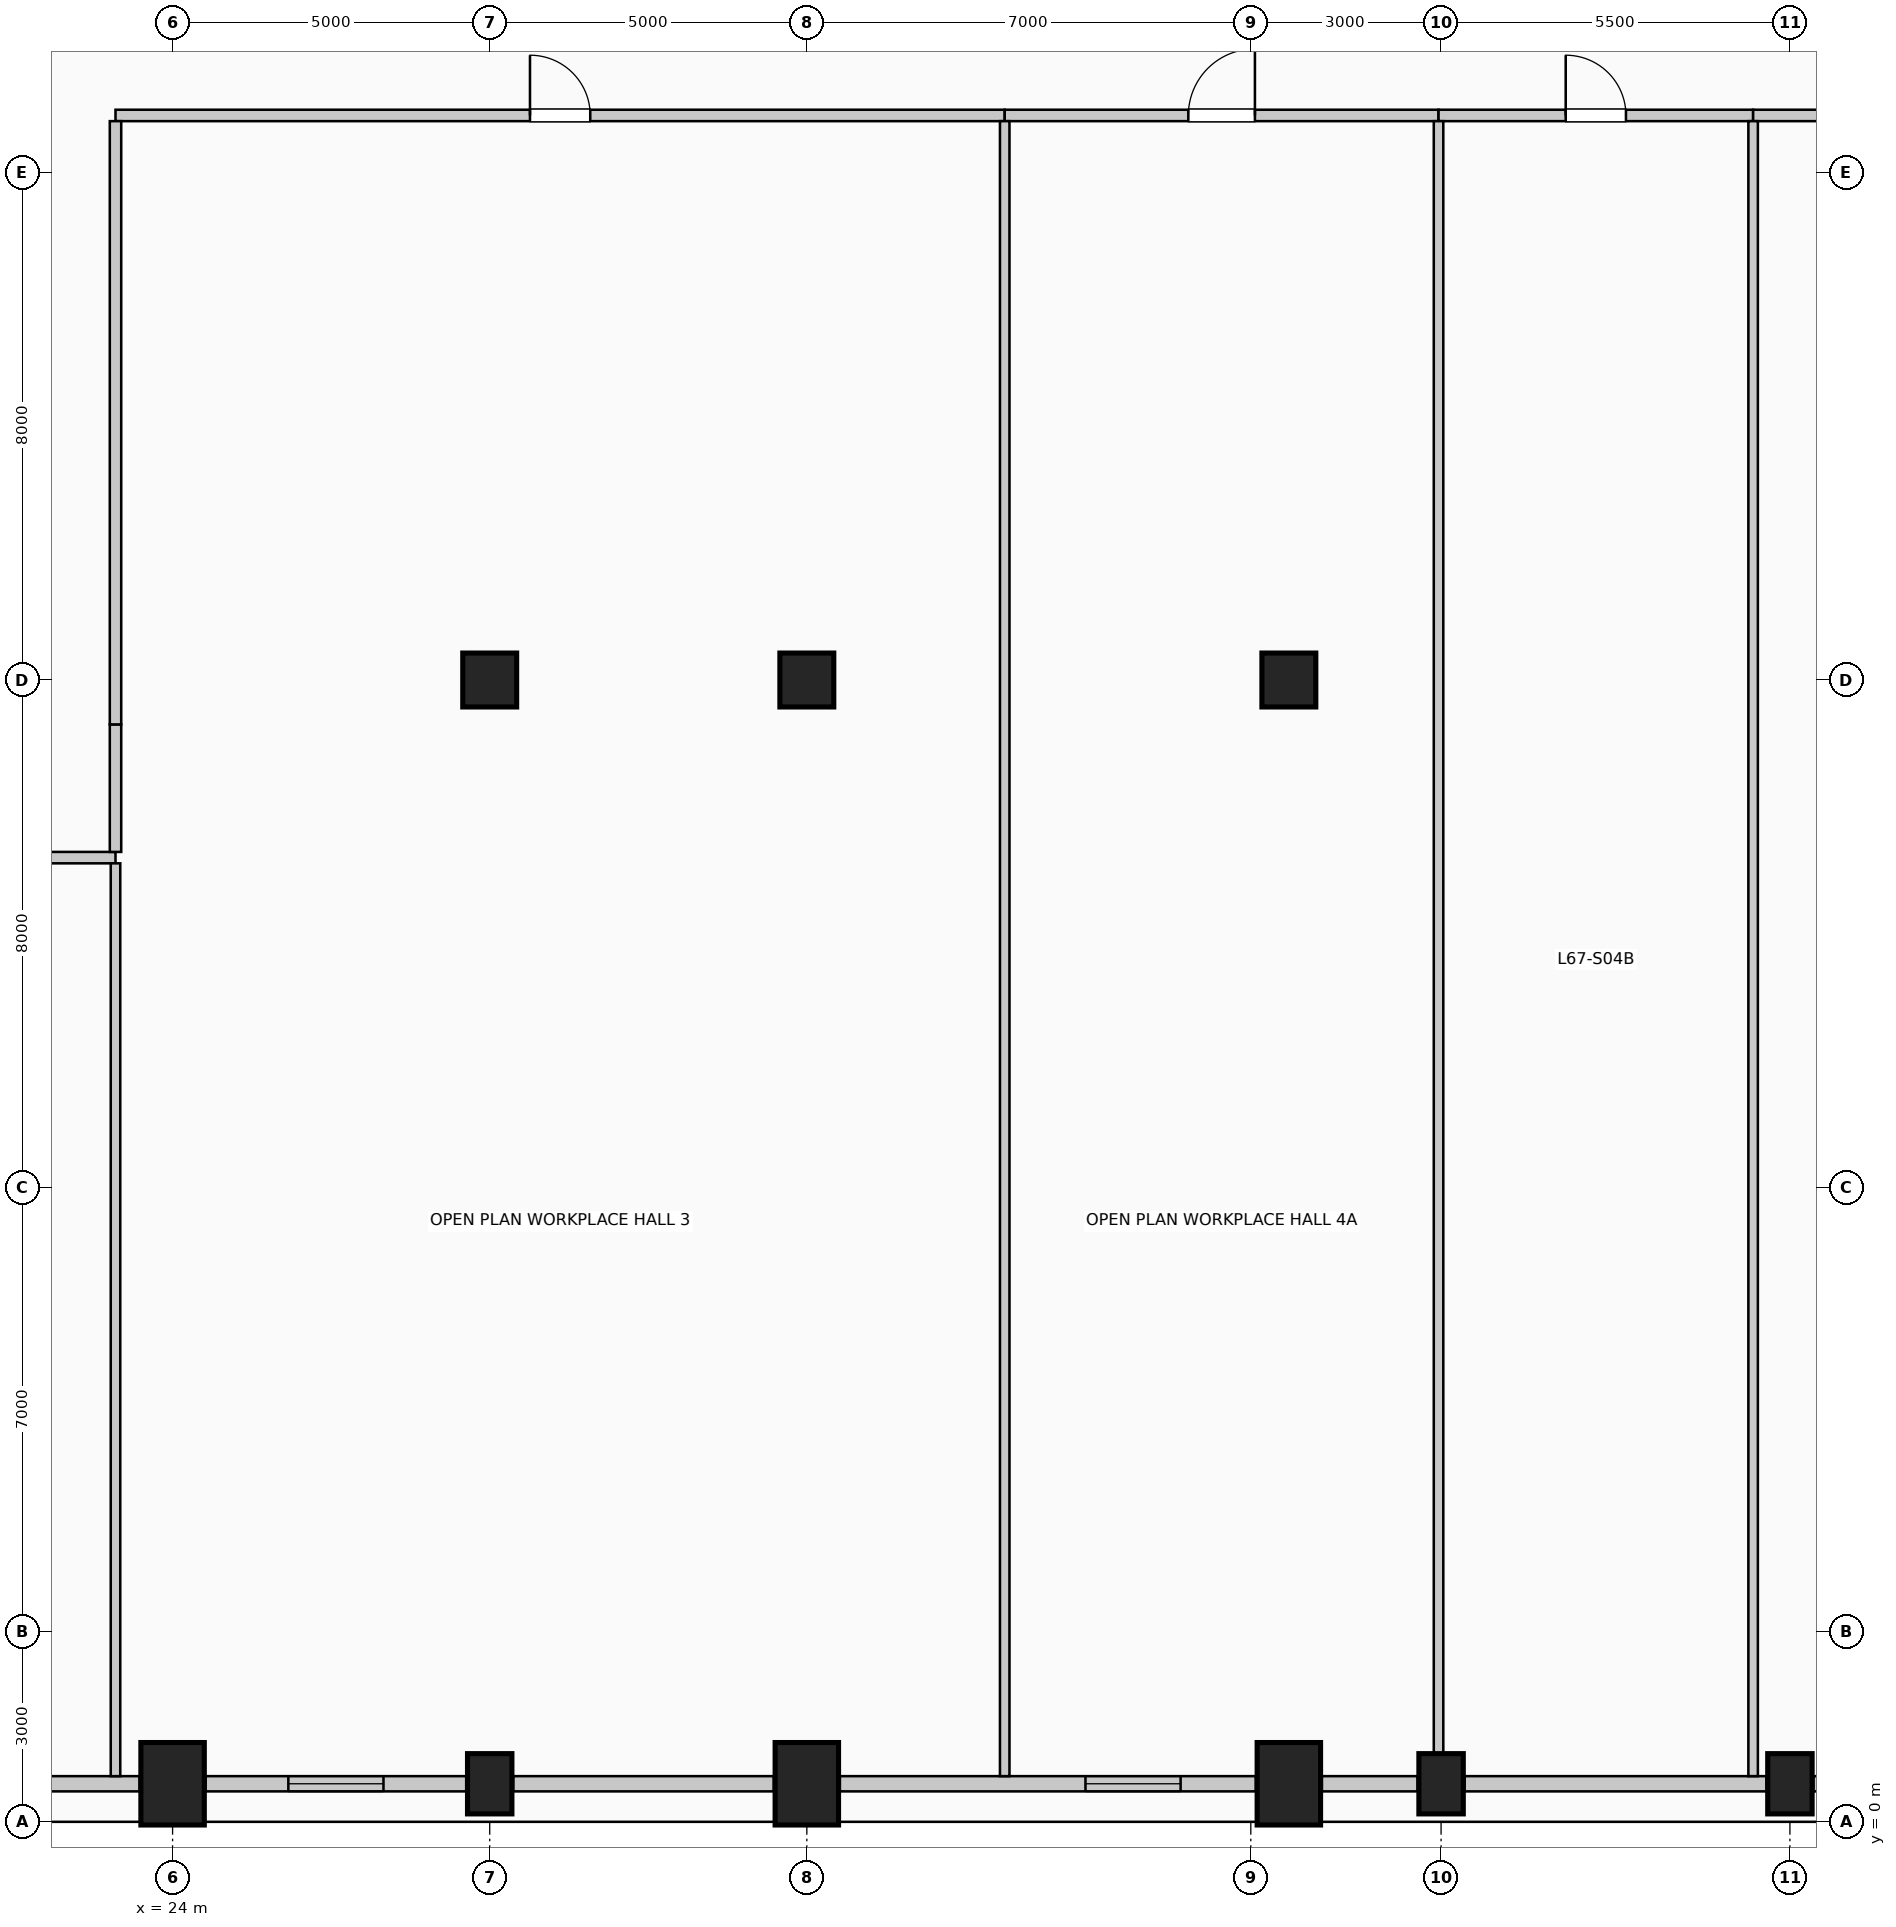
"""IFC4 building model, lengths in metres.
Left out: names, types, materials, properties, quantities, classifications, styles, units other than length and angle.
Written with IfcOpenShell. Run it as: python <this file> out.ifc"""

import sys

from ifc_helpers import new_model, si_unit, direction, frame, frame_2d, origin, origin_2d, place, context, subcontext, project, spatial, rectangle, circle, extrude, element, fill, save


model = new_model("IFC4")
c1 = context("Model", 3, precision=1e-05, world=origin(), true_north=direction((0.0, 1.0)))
c2 = subcontext(c1, "Body", "Model", "MODEL_VIEW")
j1 = project(units=[si_unit("LENGTHUNIT", "METRE"), si_unit("PLANEANGLEUNIT", "RADIAN")], contexts=[c1])
p1 = place(None, origin())
s1 = spatial("IfcSite", under=j1, at=p1, CompositionType="ELEMENT")
p2 = place(p1, origin())
s2 = spatial("IfcBuilding", under=s1, at=p2, CompositionType="ELEMENT")
p3 = place(p2, frame((0.0, 0.0, 276.6)))
s3 = spatial("IfcBuildingStorey", under=s2, at=p3, CompositionType="ELEMENT", Elevation=276.6)
p4 = place(p3, frame((24.0, 0.6, 0.0), z_axis=(0.0, 0.0, 1.0), x_axis=(1.0, 0.0, 0.0)))
e1 = element("IfcColumn", 1, at=p4, inside=s3, PredefinedType="COLUMN", context=c2, shape_type="SweptSolid", body=[
    extrude(rectangle(XDim=1.0, YDim=1.3, at=origin_2d()), origin(), (0.0, 0.0, 1.0), 4.0),
])
p5 = place(p3, frame((29.0, 0.6, 0.0), z_axis=(0.0, 0.0, 1.0), x_axis=(1.0, 0.0, 0.0)))
e2 = element("IfcColumn", 2, at=p5, inside=s3, PredefinedType="COLUMN", context=c2, shape_type="SweptSolid", body=[
    extrude(rectangle(XDim=0.7, YDim=0.95, at=origin_2d()), origin(), (0.0, 0.0, 1.0), 4.0),
])
for number, where, z_axis, x_axis in (
    (3, (34.0, 0.6, 0.0), (0.0, 0.0, 1.0), (1.0, 0.0, 0.0)),
    (4, (41.6, 0.6, 0.0), (0.0, 0.0, 1.0), (1.0, 0.0, 0.0)),
):
    element("IfcColumn", number, at=place(p3, frame(where, z_axis=z_axis, x_axis=x_axis)), inside=s3, PredefinedType="COLUMN", context=c2, shape_type="SweptSolid", body=[
        extrude(rectangle(XDim=1.0, YDim=1.3, at=origin_2d()), origin(), (0.0, 0.0, 1.0), 4.0),
    ])
for number, where, z_axis, x_axis in (
    (5, (44.0, 0.6, 0.0), (0.0, 0.0, 1.0), (1.0, 0.0, 0.0)),
    (6, (49.5, 0.6, 0.0), (0.0, 0.0, 1.0), (1.0, 0.0, 0.0)),
):
    element("IfcColumn", number, at=place(p3, frame(where, z_axis=z_axis, x_axis=x_axis)), inside=s3, PredefinedType="COLUMN", context=c2, shape_type="SweptSolid", body=[
        extrude(rectangle(XDim=0.7, YDim=0.95, at=origin_2d()), origin(), (0.0, 0.0, 1.0), 4.0),
    ])
for number, where, z_axis, x_axis in (
    (7, (29.0, 18.0, 0.0), (0.0, 0.0, 1.0), (1.0, 0.0, 0.0)),
    (8, (41.6, 18.0, 0.0), (0.0, 0.0, 1.0), (1.0, 0.0, 0.0)),
    (9, (34.0, 18.0, 0.0), (0.0, 0.0, 1.0), (1.0, 0.0, 0.0)),
):
    element("IfcColumn", number, at=place(p3, frame(where, z_axis=z_axis, x_axis=x_axis)), inside=s3, PredefinedType="COLUMN", context=c2, shape_type="SweptSolid", body=[
        extrude(circle(Radius=0.425, at=origin_2d()), origin(), (0.0, 0.0, 1.0), 4.0),
    ])
p6 = place(p3, frame((23.48, 0.6, 0.0), z_axis=(0.0, 0.0, 1.0), x_axis=(-1.0, 0.0, 0.0)))
e10 = element("IfcWall", 10, at=p6, inside=s3, PredefinedType="SOLIDWALL", context=c2, shape_type="SweptSolid", body=[
    extrude(rectangle(XDim=6.56, YDim=0.24, at=frame_2d((3.28, 0.0))), origin(), (0.0, 0.0, 1.0), 2.91),
])
p7 = place(p6, frame((3.873, 0.0, 0.42)))
e11 = element("IfcOpeningElement", 11, at=p7, cuts=e10, PredefinedType="OPENING", context=c2, shape_type="SweptSolid", body=[
    extrude(rectangle(XDim=1.5, YDim=2.2, at=frame_2d((0.75, 1.1))), frame((0.0, 0.13, 0.0), z_axis=(0.0, -1.0, 0.0), x_axis=(1.0, 0.0, 0.0)), (0.0, 0.0, 1.0), 0.26),
])
p8 = place(p3, frame((28.63, 0.6, 0.0), z_axis=(0.0, 0.0, 1.0), x_axis=(-1.0, 0.0, 0.0)))
e12 = element("IfcWall", 12, at=p8, inside=s3, PredefinedType="SOLIDWALL", context=c2, shape_type="SweptSolid", body=[
    extrude(rectangle(XDim=4.11, YDim=0.24, at=frame_2d((2.055, 0.0))), origin(), (0.0, 0.0, 1.0), 2.91),
])
p9 = place(p8, frame((1.305, 0.0, 0.42)))
e13 = element("IfcOpeningElement", 13, at=p9, cuts=e12, PredefinedType="OPENING", context=c2, shape_type="SweptSolid", body=[
    extrude(rectangle(XDim=1.5, YDim=2.2, at=frame_2d((0.75, 1.1))), frame((0.0, 0.13, 0.0), z_axis=(0.0, -1.0, 0.0), x_axis=(1.0, 0.0, 0.0)), (0.0, 0.0, 1.0), 0.26),
])
p10 = place(p3, frame((33.48, 0.6, 0.0), z_axis=(0.0, 0.0, 1.0), x_axis=(-1.0, 0.0, 0.0)))
e14 = element("IfcWall", 14, at=p10, inside=s3, PredefinedType="SOLIDWALL", context=c2, shape_type="SweptSolid", body=[
    extrude(rectangle(XDim=4.11, YDim=0.24, at=frame_2d((2.055, 0.0))), origin(), (0.0, 0.0, 1.0), 2.91),
])
p11 = place(p3, frame((41.08, 0.6, 0.0), z_axis=(0.0, 0.0, 1.0), x_axis=(-1.0, 0.0, 0.0)))
e15 = element("IfcWall", 15, at=p11, inside=s3, PredefinedType="SOLIDWALL", context=c2, shape_type="SweptSolid", body=[
    extrude(rectangle(XDim=6.56, YDim=0.24, at=frame_2d((3.28, 0.0))), origin(), (0.0, 0.0, 1.0), 2.91),
])
p12 = place(p11, frame((1.187, 0.0, 0.42)))
e16 = element("IfcOpeningElement", 16, at=p12, cuts=e15, PredefinedType="OPENING", context=c2, shape_type="SweptSolid", body=[
    extrude(rectangle(XDim=1.5, YDim=2.2, at=frame_2d((0.75, 1.1))), frame((0.0, 0.13, 0.0), z_axis=(0.0, -1.0, 0.0), x_axis=(1.0, 0.0, 0.0)), (0.0, 0.0, 1.0), 0.26),
])
p13 = place(p3, frame((43.63, 0.6, 0.0), z_axis=(0.0, 0.0, 1.0), x_axis=(-1.0, 0.0, 0.0)))
e17 = element("IfcWall", 17, at=p13, inside=s3, PredefinedType="SOLIDWALL", context=c2, shape_type="SweptSolid", body=[
    extrude(rectangle(XDim=1.51, YDim=0.24, at=frame_2d((0.755, 0.0))), origin(), (0.0, 0.0, 1.0), 2.91),
])
p14 = place(p3, frame((49.13, 0.6, 0.0), z_axis=(0.0, 0.0, 1.0), x_axis=(-1.0, 0.0, 0.0)))
e18 = element("IfcWall", 18, at=p14, inside=s3, PredefinedType="SOLIDWALL", context=c2, shape_type="SweptSolid", body=[
    extrude(rectangle(XDim=4.76, YDim=0.24, at=frame_2d((2.38, 0.0))), origin(), (0.0, 0.0, 1.0), 2.91),
])
p15 = place(p3, frame((54.03, 0.6, 0.0), z_axis=(0.0, 0.0, 1.0), x_axis=(-1.0, 0.0, 0.0)))
e19 = element("IfcWall", 19, at=p15, inside=s3, PredefinedType="SOLIDWALL", context=c2, shape_type="SweptSolid", body=[
    extrude(rectangle(XDim=4.16, YDim=0.24, at=frame_2d((2.08, 0.0))), origin(), (0.0, 0.0, 1.0), 2.91),
])
p16 = place(p15, frame((1.33, 0.0, 0.42)))
e20 = element("IfcOpeningElement", 20, at=p16, cuts=e19, PredefinedType="OPENING", context=c2, shape_type="SweptSolid", body=[
    extrude(rectangle(XDim=1.5, YDim=2.2, at=frame_2d((0.75, 1.1))), frame((0.0, 0.13, 0.0), z_axis=(0.0, -1.0, 0.0), x_axis=(1.0, 0.0, 0.0)), (0.0, 0.0, 1.0), 0.26),
])
p17 = place(p3, frame((10.52, 15.2, 0.0), z_axis=(0.0, 0.0, 1.0), x_axis=(1.0, 0.0, 0.0)))
e21 = element("IfcWall", 21, at=p17, inside=s3, PredefinedType="PARTITIONING", context=c2, shape_type="SweptSolid", body=[
    extrude(rectangle(XDim=12.58, YDim=0.18, at=frame_2d((6.29, 0.0))), origin(), (0.0, 0.0, 1.0), 3.66),
])
p18 = place(p17, frame((5.765, 0.0, 0.0)))
e22 = element("IfcOpeningElement", 22, at=p18, cuts=e21, PredefinedType="OPENING", context=c2, shape_type="SweptSolid", body=[
    extrude(rectangle(XDim=1.05, YDim=2.15, at=frame_2d((0.525, 1.075))), frame((0.0, 0.1, 0.0), z_axis=(0.0, -1.0, 0.0), x_axis=(1.0, 0.0, 0.0)), (0.0, 0.0, 1.0), 0.2),
])
p19 = place(p3, frame((23.1, 26.9, 0.0), z_axis=(0.0, 0.0, 1.0), x_axis=(1.0, 0.0, 0.0)))
e23 = element("IfcWall", 23, at=p19, inside=s3, PredefinedType="PARTITIONING", context=c2, shape_type="SweptSolid", body=[
    extrude(rectangle(XDim=14.02, YDim=0.18, at=frame_2d((7.01, 0.0))), origin(), (0.0, 0.0, 1.0), 3.66),
])
p20 = place(p19, frame((6.535, 0.0, 0.0)))
e24 = element("IfcOpeningElement", 24, at=p20, cuts=e23, PredefinedType="OPENING", context=c2, shape_type="SweptSolid", body=[
    extrude(rectangle(XDim=0.95, YDim=2.15, at=frame_2d((0.475, 1.075))), frame((0.0, 0.1, 0.0), z_axis=(0.0, -1.0, 0.0), x_axis=(1.0, 0.0, 0.0)), (0.0, 0.0, 1.0), 0.2),
])
p21 = place(p3, frame((37.12, 26.9, 0.0), z_axis=(0.0, 0.0, 1.0), x_axis=(1.0, 0.0, 0.0)))
e25 = element("IfcWall", 25, at=p21, inside=s3, PredefinedType="PARTITIONING", context=c2, shape_type="SweptSolid", body=[
    extrude(rectangle(XDim=6.84, YDim=0.18, at=frame_2d((3.42, 0.0))), origin(), (0.0, 0.0, 1.0), 3.66),
])
p22 = place(p21, frame((2.895, 0.0, 0.0)))
e26 = element("IfcOpeningElement", 26, at=p22, cuts=e25, PredefinedType="OPENING", context=c2, shape_type="SweptSolid", body=[
    extrude(rectangle(XDim=1.05, YDim=2.15, at=frame_2d((0.525, 1.075))), frame((0.0, 0.1, 0.0), z_axis=(0.0, -1.0, 0.0), x_axis=(1.0, 0.0, 0.0)), (0.0, 0.0, 1.0), 0.2),
])
p23 = place(p3, frame((43.96, 26.9, 0.0), z_axis=(0.0, 0.0, 1.0), x_axis=(1.0, 0.0, 0.0)))
e27 = element("IfcWall", 27, at=p23, inside=s3, PredefinedType="PARTITIONING", context=c2, shape_type="SweptSolid", body=[
    extrude(rectangle(XDim=4.96, YDim=0.18, at=frame_2d((2.48, 0.0))), origin(), (0.0, 0.0, 1.0), 3.66),
])
p24 = place(p23, frame((2.005, 0.0, 0.0)))
e28 = element("IfcOpeningElement", 28, at=p24, cuts=e27, PredefinedType="OPENING", context=c2, shape_type="SweptSolid", body=[
    extrude(rectangle(XDim=0.95, YDim=2.15, at=frame_2d((0.475, 1.075))), frame((0.0, 0.1, 0.0), z_axis=(0.0, -1.0, 0.0), x_axis=(1.0, 0.0, 0.0)), (0.0, 0.0, 1.0), 0.2),
])
p25 = place(p3, frame((48.92, 26.9, 0.0), z_axis=(0.0, 0.0, 1.0), x_axis=(1.0, 0.0, 0.0)))
e29 = element("IfcWall", 29, at=p25, inside=s3, PredefinedType="PARTITIONING", context=c2, shape_type="SweptSolid", body=[
    extrude(rectangle(XDim=8.36, YDim=0.18, at=frame_2d((4.18, 0.0))), origin(), (0.0, 0.0, 1.0), 3.66),
])
p26 = place(p25, frame((3.74, 0.0, 0.0)))
e30 = element("IfcOpeningElement", 30, at=p26, cuts=e29, PredefinedType="OPENING", context=c2, shape_type="SweptSolid", body=[
    extrude(rectangle(XDim=0.88, YDim=2.1, at=frame_2d((0.44, 1.05))), frame((0.0, 0.1, 0.0), z_axis=(0.0, -1.0, 0.0), x_axis=(1.0, 0.0, 0.0)), (0.0, 0.0, 1.0), 0.2),
])
p27 = place(p3, frame((23.1, 0.72, 0.0), z_axis=(0.0, 0.0, 1.0), x_axis=(0.0, 1.0, 0.0)))
e31 = element("IfcWall", 31, at=p27, inside=s3, PredefinedType="PARTITIONING", context=c2, shape_type="SweptSolid", body=[
    extrude(rectangle(XDim=14.39, YDim=0.15, at=frame_2d((7.195, 0.0))), origin(), (0.0, 0.0, 1.0), 3.66),
])
p28 = place(p3, frame((23.1, 15.29, 0.0), z_axis=(0.0, 0.0, 1.0), x_axis=(0.0, 1.0, 0.0)))
e32 = element("IfcWall", 32, at=p28, inside=s3, PredefinedType="PARTITIONING", context=c2, shape_type="SweptSolid", body=[
    extrude(rectangle(XDim=2.01, YDim=0.18, at=frame_2d((1.005, 0.0))), origin(), (0.0, 0.0, 1.0), 3.66),
])
p29 = place(p3, frame((23.1, 17.3, 0.0), z_axis=(0.0, 0.0, 1.0), x_axis=(0.0, 1.0, 0.0)))
e33 = element("IfcWall", 33, at=p29, inside=s3, PredefinedType="PARTITIONING", context=c2, shape_type="SweptSolid", body=[
    extrude(rectangle(XDim=9.51, YDim=0.18, at=frame_2d((4.755, 0.0))), origin(), (0.0, 0.0, 1.0), 3.66),
])
p30 = place(p3, frame((37.12, 0.72, 0.0), z_axis=(0.0, 0.0, 1.0), x_axis=(0.0, 1.0, 0.0)))
e34 = element("IfcWall", 34, at=p30, inside=s3, PredefinedType="PARTITIONING", context=c2, shape_type="SweptSolid", body=[
    extrude(rectangle(XDim=26.09, YDim=0.15, at=frame_2d((13.045, 0.0))), origin(), (0.0, 0.0, 1.0), 3.66),
])
p31 = place(p3, frame((43.96, 1.075, 0.0), z_axis=(0.0, 0.0, 1.0), x_axis=(0.0, 1.0, 0.0)))
e35 = element("IfcWall", 35, at=p31, inside=s3, PredefinedType="PARTITIONING", context=c2, shape_type="SweptSolid", body=[
    extrude(rectangle(XDim=25.735, YDim=0.15, at=frame_2d((12.868, 0.0))), origin(), (0.0, 0.0, 1.0), 3.66),
])
p32 = place(p3, frame((48.92, 0.72, 0.0), z_axis=(0.0, 0.0, 1.0), x_axis=(0.0, 1.0, 0.0)))
e36 = element("IfcWall", 36, at=p32, inside=s3, PredefinedType="PARTITIONING", context=c2, shape_type="SweptSolid", body=[
    extrude(rectangle(XDim=26.09, YDim=0.15, at=frame_2d((13.045, 0.0))), origin(), (0.0, 0.0, 1.0), 3.66),
])
p33 = place(p9, origin())
e37 = element("IfcWindow", 37, at=p33, inside=s3, PartitioningType="SINGLE_PANEL", PredefinedType="WINDOW", context=c2, shape_type="SweptSolid", body=[
    extrude(rectangle(XDim=1.5, YDim=2.2, at=frame_2d((0.75, 1.1))), frame((0.0, 0.03, 0.0), z_axis=(0.0, -1.0, 0.0), x_axis=(1.0, 0.0, 0.0)), (0.0, 0.0, 1.0), 0.06),
])
fill(e13, e37)
p34 = place(p12, origin())
e38 = element("IfcWindow", 38, at=p34, inside=s3, PartitioningType="SINGLE_PANEL", PredefinedType="WINDOW", context=c2, shape_type="SweptSolid", body=[
    extrude(rectangle(XDim=1.5, YDim=2.2, at=frame_2d((0.75, 1.1))), frame((0.0, 0.03, 0.0), z_axis=(0.0, -1.0, 0.0), x_axis=(1.0, 0.0, 0.0)), (0.0, 0.0, 1.0), 0.06),
])
fill(e16, e38)
p35 = place(p20, origin())
e39 = element("IfcDoor", 39, at=p35, inside=s3, OperationType="SINGLE_SWING_LEFT", PredefinedType="DOOR", context=c2, shape_type="SweptSolid", body=[
    extrude(rectangle(XDim=0.95, YDim=2.15, at=frame_2d((0.475, 1.075))), frame((0.0, 0.025, 0.0), z_axis=(0.0, -1.0, 0.0), x_axis=(1.0, 0.0, 0.0)), (0.0, 0.0, 1.0), 0.05),
])
fill(e24, e39)
p36 = place(p22, origin())
e40 = element("IfcDoor", 40, at=p36, inside=s3, OperationType="SINGLE_SWING_RIGHT", PredefinedType="DOOR", context=c2, shape_type="SweptSolid", body=[
    extrude(rectangle(XDim=1.05, YDim=2.15, at=frame_2d((0.525, 1.075))), frame((0.0, 0.025, 0.0), z_axis=(0.0, -1.0, 0.0), x_axis=(1.0, 0.0, 0.0)), (0.0, 0.0, 1.0), 0.05),
])
fill(e26, e40)
p37 = place(p24, origin())
e41 = element("IfcDoor", 41, at=p37, inside=s3, OperationType="SINGLE_SWING_LEFT", PredefinedType="DOOR", context=c2, shape_type="SweptSolid", body=[
    extrude(rectangle(XDim=0.95, YDim=2.15, at=frame_2d((0.475, 1.075))), frame((0.0, 0.025, 0.0), z_axis=(0.0, -1.0, 0.0), x_axis=(1.0, 0.0, 0.0)), (0.0, 0.0, 1.0), 0.05),
])
fill(e28, e41)
save(model, sys.argv[1])
